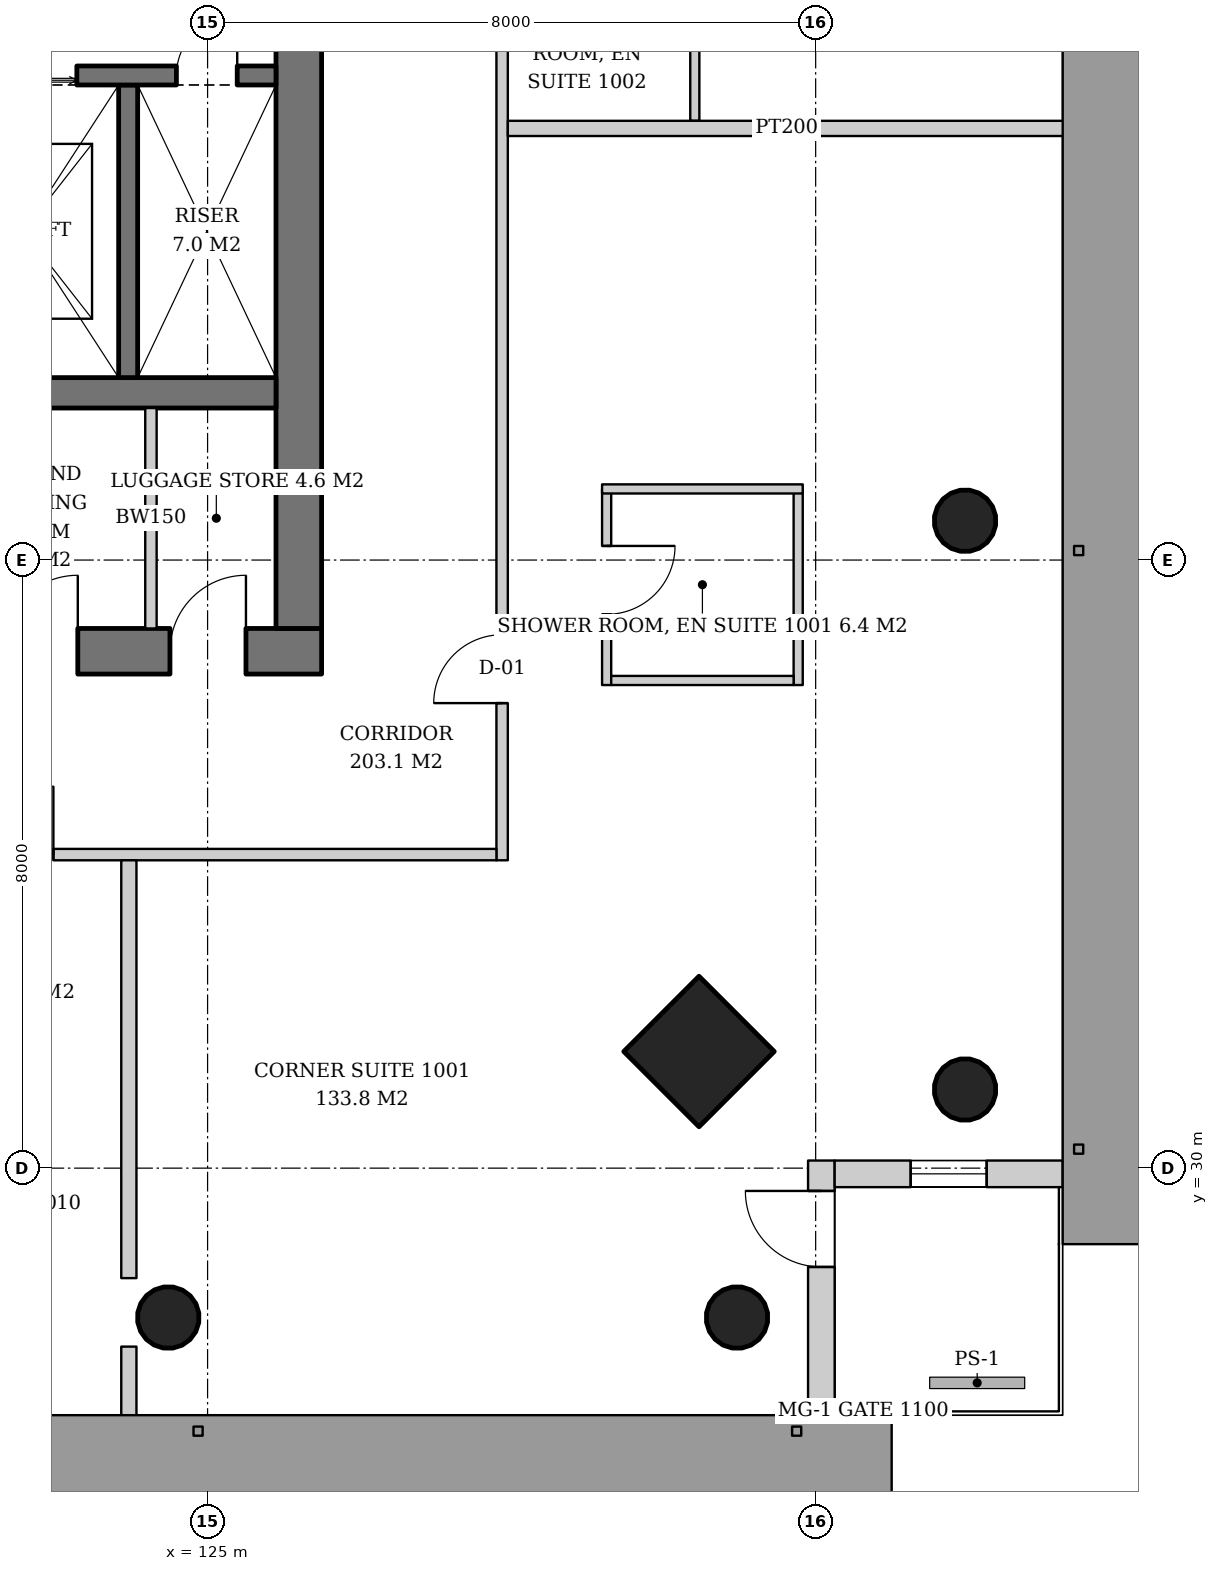
"""IFC4 building model, lengths in metres.
Left out: names, types, materials, properties, quantities, classifications, styles, units other than length and angle.
Written with IfcOpenShell. Run it as: python <this file> out.ifc"""

import sys

from ifc_helpers import new_model, si_unit, direction, frame, frame_2d, origin, origin_2d, place, context, subcontext, project, spatial, rectangle, hollow_circle, extrude, element, fill, save


model = new_model("IFC4")
c1 = context("Model", 3, precision=1e-05, world=origin(), true_north=direction((0.0, 1.0)))
c2 = subcontext(c1, "Body", "Model", "MODEL_VIEW")
j1 = project(units=[si_unit("LENGTHUNIT", "METRE"), si_unit("PLANEANGLEUNIT", "RADIAN")], contexts=[c1])
p1 = place(None, origin())
s1 = spatial("IfcSite", under=j1, at=p1, CompositionType="ELEMENT")
p2 = place(p1, origin())
s2 = spatial("IfcBuilding", under=s1, at=p2, CompositionType="ELEMENT")
p3 = place(p2, frame((0.0, 0.0, 43.8)))
s3 = spatial("IfcBuildingStorey", under=s2, at=p3, CompositionType="ELEMENT", Elevation=43.8)
p4 = place(p3, frame((135.017, 30.983, 0.0), z_axis=(-0.043029647111, 0.043029647111, 0.998146732169), x_axis=(-0.707106781187, -0.707106781187, 0.0)))
e1 = element("IfcColumn", 1, at=p4, inside=s3, PredefinedType="COLUMN", context=c2, shape_type="SweptSolid", body=[
    extrude(hollow_circle(Radius=0.406, WallThickness=0.03, at=origin_2d()), origin(), (0.0, 0.0, 1.0), 3.807),
])
p5 = place(p3, frame((135.017, 38.491, 0.0), z_axis=(-0.043059584825, 0.021497706284, 0.998841188968), x_axis=(-0.446680166538, -0.894693706707, 0.0)))
e2 = element("IfcColumn", 2, at=p5, inside=s3, PredefinedType="COLUMN", context=c2, shape_type="SweptSolid", body=[
    extrude(hollow_circle(Radius=0.406, WallThickness=0.03, at=origin_2d()), origin(), (0.0, 0.0, 1.0), 3.804),
])
p6 = place(p3, frame((131.517, 31.483, 0.0), z_axis=(-0.043029647111, 0.043029647111, 0.998146732169), x_axis=(-0.707106781187, -0.707106781187, 0.0)))
e3 = element("IfcColumn", 3, at=p6, inside=s3, PredefinedType="COLUMN", context=c2, shape_type="SweptSolid", body=[
    extrude(rectangle(XDim=1.4, YDim=1.4, at=origin_2d()), origin(), (0.0, 0.0, 1.0), 3.807),
])
p7 = place(p3, frame((132.017, 27.983, 0.0), z_axis=(-0.043029647111, 0.043029647111, 0.998146732169), x_axis=(-0.707106781187, -0.707106781187, 0.0)))
e4 = element("IfcColumn", 4, at=p7, inside=s3, PredefinedType="COLUMN", context=c2, shape_type="SweptSolid", body=[
    extrude(hollow_circle(Radius=0.406, WallThickness=0.03, at=origin_2d()), origin(), (0.0, 0.0, 1.0), 3.807),
])
p8 = place(p3, frame((124.509, 27.983, 0.0), z_axis=(-0.021497706284, 0.043059584825, 0.998841188968), x_axis=(-0.894693706707, -0.446680166538, 0.0)))
e5 = element("IfcColumn", 5, at=p8, inside=s3, PredefinedType="COLUMN", context=c2, shape_type="SweptSolid", body=[
    extrude(hollow_circle(Radius=0.406, WallThickness=0.03, at=origin_2d()), origin(), (0.0, 0.0, 1.0), 3.804),
])
p9 = place(p3, frame((107.5, 36.8, 0.0), z_axis=(0.0, 0.0, 1.0), x_axis=(1.0, 0.0, 0.0)))
e6 = element("IfcWall", 6, at=p9, inside=s3, PredefinedType="SHEAR", context=c2, shape_type="SweptSolid", body=[
    extrude(rectangle(XDim=19.0, YDim=0.6, at=frame_2d((9.5, 0.0))), origin(), (0.0, 0.0, 1.0), 3.8),
])
p10 = place(p9, frame((3.9, 0.0, 0.0)))
e7 = element("IfcOpeningElement", 7, at=p10, cuts=e6, PredefinedType="OPENING", context=c2, shape_type="SweptSolid", body=[
    extrude(rectangle(XDim=1.0, YDim=2.1, at=frame_2d((0.5, 1.05))), frame((0.0, 0.31, 0.0), z_axis=(0.0, -1.0, 0.0), x_axis=(1.0, 0.0, 0.0)), (0.0, 0.0, 1.0), 0.62),
])
p11 = place(p9, frame((14.792, 0.0, 0.0)))
e8 = element("IfcOpeningElement", 8, at=p11, cuts=e6, PredefinedType="OPENING", context=c2, shape_type="SweptSolid", body=[
    extrude(rectangle(XDim=1.0, YDim=2.1, at=frame_2d((0.5, 1.05))), frame((0.0, 0.31, 0.0), z_axis=(0.0, -1.0, 0.0), x_axis=(1.0, 0.0, 0.0)), (0.0, 0.0, 1.0), 0.62),
])
p12 = place(p9, frame((17.005, 0.0, 0.0)))
e9 = element("IfcOpeningElement", 9, at=p12, cuts=e6, PredefinedType="OPENING", context=c2, shape_type="SweptSolid", body=[
    extrude(rectangle(XDim=1.0, YDim=2.1, at=frame_2d((0.5, 1.05))), frame((0.0, 0.31, 0.0), z_axis=(0.0, -1.0, 0.0), x_axis=(1.0, 0.0, 0.0)), (0.0, 0.0, 1.0), 0.62),
])
p13 = place(p3, frame((126.2, 37.1, 0.0), z_axis=(0.0, 0.0, 1.0), x_axis=(0.0, 1.0, 0.0)))
e10 = element("IfcWall", 10, at=p13, inside=s3, PredefinedType="SHEAR", context=c2, shape_type="SweptSolid", body=[
    extrude(rectangle(XDim=17.8, YDim=0.6, at=frame_2d((8.9, 0.0))), origin(), (0.0, 0.0, 1.0), 3.8),
])
p14 = place(p13, frame((8.0, 0.0, 0.0)))
e11 = element("IfcOpeningElement", 11, at=p14, cuts=e10, PredefinedType="OPENING", context=c2, shape_type="SweptSolid", body=[
    extrude(rectangle(XDim=1.8, YDim=2.4, at=frame_2d((0.9, 1.2))), frame((0.0, 0.31, 0.0), z_axis=(0.0, -1.0, 0.0), x_axis=(1.0, 0.0, 0.0)), (0.0, 0.0, 1.0), 0.62),
])
p15 = place(p3, frame((108.1, 40.2, 0.0), z_axis=(0.0, 0.0, 1.0), x_axis=(1.0, 0.0, 0.0)))
e12 = element("IfcWall", 12, at=p15, inside=s3, PredefinedType="SHEAR", context=c2, shape_type="SweptSolid", body=[
    extrude(rectangle(XDim=17.8, YDim=0.4, at=frame_2d((8.9, 0.0))), origin(), (0.0, 0.0, 1.0), 3.8),
])
p16 = place(p3, frame((133.075, 26.75, 0.0), z_axis=(0.0, 0.0, 1.0), x_axis=(0.0, 1.0, 0.0)))
e13 = element("IfcWall", 13, at=p16, inside=s3, PredefinedType="SOLIDWALL", context=c2, shape_type="SweptSolid", body=[
    extrude(rectangle(XDim=3.35, YDim=0.35, at=frame_2d((1.675, 0.0))), origin(), (0.0, 0.0, 1.0), 3.6),
])
p17 = place(p16, frame((1.95, 0.0, 0.0)))
e14 = element("IfcOpeningElement", 14, at=p17, cuts=e13, PredefinedType="OPENING", context=c2, shape_type="SweptSolid", body=[
    extrude(rectangle(XDim=1.0, YDim=2.4, at=frame_2d((0.5, 1.2))), frame((0.0, 0.185, 0.0), z_axis=(0.0, -1.0, 0.0), x_axis=(1.0, 0.0, 0.0)), (0.0, 0.0, 1.0), 0.37),
])
p18 = place(p3, frame((133.25, 29.925, 0.0), z_axis=(0.0, 0.0, 1.0), x_axis=(1.0, 0.0, 0.0)))
e15 = element("IfcWall", 15, at=p18, inside=s3, PredefinedType="SOLIDWALL", context=c2, shape_type="SweptSolid", body=[
    extrude(rectangle(XDim=3.0, YDim=0.35, at=frame_2d((1.5, 0.0))), origin(), (0.0, 0.0, 1.0), 3.6),
])
p19 = place(p18, frame((1.0, 0.0, 0.9)))
e16 = element("IfcOpeningElement", 16, at=p19, cuts=e15, PredefinedType="OPENING", context=c2, shape_type="SweptSolid", body=[
    extrude(rectangle(XDim=1.0, YDim=2.4, at=frame_2d((0.5, 1.2))), frame((0.0, 0.185, 0.0), z_axis=(0.0, -1.0, 0.0), x_axis=(1.0, 0.0, 0.0)), (0.0, 0.0, 1.0), 0.37),
])
p20 = place(p3, frame((123.955, 44.25, 0.0), z_axis=(0.0, 0.0, 1.0), x_axis=(0.0, -1.0, 0.0)))
e17 = element("IfcWall", 17, at=p20, inside=s3, PredefinedType="SHEAR", context=c2, shape_type="SweptSolid", body=[
    extrude(rectangle(XDim=3.85, YDim=0.25, at=frame_2d((1.925, 0.0))), origin(), (0.0, 0.0, 1.0), 3.8),
])
p21 = place(p3, frame((121.33, 44.375, 0.0), z_axis=(0.0, 0.0, 1.0), x_axis=(1.0, 0.0, 0.0)))
e18 = element("IfcWall", 18, at=p21, inside=s3, PredefinedType="SHEAR", context=c2, shape_type="SweptSolid", body=[
    extrude(rectangle(XDim=4.57, YDim=0.25, at=frame_2d((2.285, 0.0))), origin(), (0.0, 0.0, 1.0), 3.8),
])
p22 = place(p21, frame((0.55, 0.0, 0.0)))
e19 = element("IfcOpeningElement", 19, at=p22, cuts=e18, PredefinedType="OPENING", context=c2, shape_type="SweptSolid", body=[
    extrude(rectangle(XDim=1.4, YDim=2.4, at=frame_2d((0.7, 1.2))), frame((0.0, 0.135, 0.0), z_axis=(0.0, -1.0, 0.0), x_axis=(1.0, 0.0, 0.0)), (0.0, 0.0, 1.0), 0.27),
])
p23 = place(p21, frame((3.26, 0.0, 0.0)))
e20 = element("IfcOpeningElement", 20, at=p23, cuts=e18, PredefinedType="OPENING", context=c2, shape_type="SweptSolid", body=[
    extrude(rectangle(XDim=0.8, YDim=2.0, at=frame_2d((0.4, 1.0))), frame((0.0, 0.135, 0.0), z_axis=(0.0, -1.0, 0.0), x_axis=(1.0, 0.0, 0.0)), (0.0, 0.0, 1.0), 0.27),
])
p24 = place(p3, frame((124.255, 37.1, 0.0), z_axis=(0.0, 0.0, 1.0), x_axis=(0.0, 1.0, 0.0)))
e21 = element("IfcWall", 21, at=p24, inside=s3, PredefinedType="SOLIDWALL", context=c2, shape_type="SweptSolid", body=[
    extrude(rectangle(XDim=2.9, YDim=0.15, at=frame_2d((1.45, 0.0))), origin(), (0.0, 0.0, 1.0), 3.6),
])
p25 = place(p3, frame((130.25, 38.936, 0.0), z_axis=(0.0, 0.0, 1.0), x_axis=(0.0, -1.0, 0.0)))
e22 = element("IfcWall", 22, at=p25, inside=s3, PredefinedType="PARTITIONING", context=c2, shape_type="SweptSolid", body=[
    extrude(rectangle(XDim=2.58, YDim=0.12, at=frame_2d((1.29, 0.0))), origin(), (0.0, 0.0, 1.0), 2.8),
])
p26 = place(p25, frame((0.75, 0.0, 0.0)))
e23 = element("IfcOpeningElement", 23, at=p26, cuts=e22, PredefinedType="OPENING", context=c2, shape_type="SweptSolid", body=[
    extrude(rectangle(XDim=0.9, YDim=2.1, at=frame_2d((0.45, 1.05))), frame((0.0, 0.07, 0.0), z_axis=(0.0, -1.0, 0.0), x_axis=(1.0, 0.0, 0.0)), (0.0, 0.0, 1.0), 0.14),
])
p27 = place(p3, frame((132.77, 38.936, 0.0), z_axis=(0.0, 0.0, 1.0), x_axis=(0.0, -1.0, 0.0)))
e24 = element("IfcWall", 24, at=p27, inside=s3, PredefinedType="PARTITIONING", context=c2, shape_type="SweptSolid", body=[
    extrude(rectangle(XDim=2.58, YDim=0.12, at=frame_2d((1.29, 0.0))), origin(), (0.0, 0.0, 1.0), 2.8),
])
p28 = place(p3, frame((130.31, 36.416, 0.0), z_axis=(0.0, 0.0, 1.0), x_axis=(1.0, 0.0, 0.0)))
e25 = element("IfcWall", 25, at=p28, inside=s3, PredefinedType="PARTITIONING", context=c2, shape_type="SweptSolid", body=[
    extrude(rectangle(XDim=2.4, YDim=0.12, at=frame_2d((1.2, 0.0))), origin(), (0.0, 0.0, 1.0), 2.847),
])
p29 = place(p3, frame((130.19, 38.936, 0.0), z_axis=(0.0, 0.0, 1.0), x_axis=(1.0, 0.0, 0.0)))
e26 = element("IfcWall", 26, at=p29, inside=s3, PredefinedType="PARTITIONING", context=c2, shape_type="SweptSolid", body=[
    extrude(rectangle(XDim=2.64, YDim=0.12, at=frame_2d((1.32, 0.0))), origin(), (0.0, 0.0, 1.0), 3.6),
])
p30 = place(p3, frame((131.41, 43.779, 0.0), z_axis=(0.0, 0.0, 1.0), x_axis=(0.0, 1.0, 0.0)))
e27 = element("IfcWall", 27, at=p30, inside=s3, PredefinedType="PARTITIONING", context=c2, shape_type="SweptSolid", body=[
    extrude(rectangle(XDim=2.42, YDim=0.12, at=frame_2d((1.21, 0.0))), origin(), (0.0, 0.0, 1.0), 2.847),
])
p31 = place(p3, frame((128.875, 34.05, 0.0), z_axis=(0.0, 0.0, 1.0), x_axis=(0.0, 1.0, 0.0)))
e28 = element("IfcWall", 28, at=p31, inside=s3, PredefinedType="PARTITIONING", context=c2, shape_type="SweptSolid", body=[
    extrude(rectangle(XDim=23.75, YDim=0.15, at=frame_2d((11.875, 0.0))), origin(), (0.0, 0.0, 1.0), 2.8),
])
p32 = place(p31, frame((2.068, 0.0, 0.0)))
e29 = element("IfcOpeningElement", 29, at=p32, cuts=e28, PredefinedType="OPENING", context=c2, shape_type="SweptSolid", body=[
    extrude(rectangle(XDim=0.9, YDim=2.1, at=frame_2d((0.45, 1.05))), frame((0.0, 0.085, 0.0), z_axis=(0.0, -1.0, 0.0), x_axis=(1.0, 0.0, 0.0)), (0.0, 0.0, 1.0), 0.17),
])
p33 = place(p31, frame((12.379, 0.0, 0.0)))
e30 = element("IfcOpeningElement", 30, at=p33, cuts=e28, PredefinedType="OPENING", context=c2, shape_type="SweptSolid", body=[
    extrude(rectangle(XDim=0.9, YDim=2.1, at=frame_2d((0.45, 1.05))), frame((0.0, 0.085, 0.0), z_axis=(0.0, -1.0, 0.0), x_axis=(1.0, 0.0, 0.0)), (0.0, 0.0, 1.0), 0.17),
])
p34 = place(p3, frame((128.95, 43.678, 0.0), z_axis=(0.0, 0.0, 1.0), x_axis=(1.0, 0.0, 0.0)))
e31 = element("IfcWall", 31, at=p34, inside=s3, PredefinedType="PARTITIONING", context=c2, shape_type="SweptSolid", body=[
    extrude(rectangle(XDim=7.34, YDim=0.2, at=frame_2d((3.67, 0.0))), origin(), (0.0, 0.0, 1.0), 3.05),
])
p35 = place(p3, frame((105.05, 34.125, 0.0), z_axis=(0.0, 0.0, 1.0), x_axis=(1.0, 0.0, 0.0)))
e32 = element("IfcWall", 32, at=p35, inside=s3, PredefinedType="PARTITIONING", context=c2, shape_type="SweptSolid", body=[
    extrude(rectangle(XDim=23.75, YDim=0.15, at=frame_2d((11.875, 0.0))), origin(), (0.0, 0.0, 1.0), 2.8),
])
p36 = place(p35, frame((2.068, 0.0, 0.0)))
e33 = element("IfcOpeningElement", 33, at=p36, cuts=e32, PredefinedType="OPENING", context=c2, shape_type="SweptSolid", body=[
    extrude(rectangle(XDim=0.9, YDim=2.1, at=frame_2d((0.45, 1.05))), frame((0.0, 0.085, 0.0), z_axis=(0.0, -1.0, 0.0), x_axis=(1.0, 0.0, 0.0)), (0.0, 0.0, 1.0), 0.17),
])
p37 = place(p35, frame((7.736, 0.0, 0.0)))
e34 = element("IfcOpeningElement", 34, at=p37, cuts=e32, PredefinedType="OPENING", context=c2, shape_type="SweptSolid", body=[
    extrude(rectangle(XDim=0.9, YDim=2.1, at=frame_2d((0.45, 1.05))), frame((0.0, 0.085, 0.0), z_axis=(0.0, -1.0, 0.0), x_axis=(1.0, 0.0, 0.0)), (0.0, 0.0, 1.0), 0.17),
])
p38 = place(p35, frame((17.021, 0.0, 0.0)))
e35 = element("IfcOpeningElement", 35, at=p38, cuts=e32, PredefinedType="OPENING", context=c2, shape_type="SweptSolid", body=[
    extrude(rectangle(XDim=0.9, YDim=2.1, at=frame_2d((0.45, 1.05))), frame((0.0, 0.085, 0.0), z_axis=(0.0, -1.0, 0.0), x_axis=(1.0, 0.0, 0.0)), (0.0, 0.0, 1.0), 0.17),
])
p39 = place(p3, frame((123.964, 34.05, 0.0), z_axis=(0.0, 0.0, 1.0), x_axis=(0.0, -1.0, 0.0)))
e36 = element("IfcWall", 36, at=p39, inside=s3, PredefinedType="PARTITIONING", context=c2, shape_type="SweptSolid", body=[
    extrude(rectangle(XDim=5.497, YDim=0.2, at=frame_2d((2.749, 0.0))), origin(), (0.0, 0.0, 1.0), 3.6),
])
p40 = place(p3, frame((123.964, 27.652, 0.0), z_axis=(0.0, 0.0, 1.0), x_axis=(0.0, -1.0, 0.0)))
e37 = element("IfcWall", 37, at=p40, inside=s3, PredefinedType="PARTITIONING", context=c2, shape_type="SweptSolid", body=[
    extrude(rectangle(XDim=0.942, YDim=0.2, at=frame_2d((0.471, 0.0))), origin(), (0.0, 0.0, 1.0), 3.6),
])
p41 = place(p17, origin())
e38 = element("IfcDoor", 38, at=p41, inside=s3, OperationType="SINGLE_SWING_RIGHT", PredefinedType="DOOR", context=c2, shape_type="SweptSolid", body=[
    extrude(rectangle(XDim=1.0, YDim=2.4, at=frame_2d((0.5, 1.2))), frame((0.0, 0.025, 0.0), z_axis=(0.0, -1.0, 0.0), x_axis=(1.0, 0.0, 0.0)), (0.0, 0.0, 1.0), 0.05),
])
fill(e14, e38)
p42 = place(p19, origin())
e39 = element("IfcWindow", 39, at=p42, inside=s3, PartitioningType="SINGLE_PANEL", PredefinedType="WINDOW", context=c2, shape_type="SweptSolid", body=[
    extrude(rectangle(XDim=1.0, YDim=2.4, at=frame_2d((0.5, 1.2))), frame((0.0, 0.03, 0.0), z_axis=(0.0, -1.0, 0.0), x_axis=(1.0, 0.0, 0.0)), (0.0, 0.0, 1.0), 0.06),
])
fill(e16, e39)
p43 = place(p22, origin())
e40 = element("IfcDoor", 40, at=p43, inside=s3, OperationType="DOUBLE_DOOR_SLIDING", PredefinedType="DOOR", context=c2, shape_type="SweptSolid", body=[
    extrude(rectangle(XDim=1.4, YDim=2.4, at=frame_2d((0.7, 1.2))), frame((0.0, 0.025, 0.0), z_axis=(0.0, -1.0, 0.0), x_axis=(1.0, 0.0, 0.0)), (0.0, 0.0, 1.0), 0.05),
])
fill(e19, e40)
p44 = place(p23, origin())
e41 = element("IfcDoor", 41, at=p44, inside=s3, OperationType="SINGLE_SWING_RIGHT", PredefinedType="DOOR", context=c2, shape_type="SweptSolid", body=[
    extrude(rectangle(XDim=0.8, YDim=2.0, at=frame_2d((0.4, 1.0))), frame((0.0, 0.025, 0.0), z_axis=(0.0, -1.0, 0.0), x_axis=(1.0, 0.0, 0.0)), (0.0, 0.0, 1.0), 0.05),
])
fill(e20, e41)
p45 = place(p11, origin())
e42 = element("IfcDoor", 42, at=p45, inside=s3, OperationType="SINGLE_SWING_RIGHT", PredefinedType="DOOR", context=c2, shape_type="SweptSolid", body=[
    extrude(rectangle(XDim=1.0, YDim=2.1, at=frame_2d((0.5, 1.05))), frame((0.0, 0.29, 0.0), z_axis=(0.0, -1.0, 0.0), x_axis=(1.0, 0.0, 0.0)), (0.0, 0.0, 1.0), 0.05),
])
fill(e8, e42)
p46 = place(p12, origin())
e43 = element("IfcDoor", 43, at=p46, inside=s3, OperationType="SINGLE_SWING_RIGHT", PredefinedType="DOOR", context=c2, shape_type="SweptSolid", body=[
    extrude(rectangle(XDim=1.0, YDim=2.1, at=frame_2d((0.5, 1.05))), frame((0.0, 0.29, 0.0), z_axis=(0.0, -1.0, 0.0), x_axis=(1.0, 0.0, 0.0)), (0.0, 0.0, 1.0), 0.05),
])
fill(e9, e43)
p47 = place(p26, origin())
e44 = element("IfcDoor", 44, at=p47, inside=s3, OperationType="SINGLE_SWING_LEFT", PredefinedType="DOOR", context=c2, shape_type="SweptSolid", body=[
    extrude(rectangle(XDim=0.9, YDim=2.1, at=frame_2d((0.45, 1.05))), frame((0.0, 0.025, 0.0), z_axis=(0.0, -1.0, 0.0), x_axis=(1.0, 0.0, 0.0)), (0.0, 0.0, 1.0), 0.05),
])
fill(e23, e44)
p48 = place(p32, origin())
e45 = element("IfcDoor", 45, at=p48, inside=s3, OperationType="SINGLE_SWING_LEFT", PredefinedType="DOOR", context=c2, shape_type="SweptSolid", body=[
    extrude(rectangle(XDim=0.9, YDim=2.1, at=frame_2d((0.45, 1.05))), frame((0.0, 0.025, 0.0), z_axis=(0.0, -1.0, 0.0), x_axis=(1.0, 0.0, 0.0)), (0.0, 0.0, 1.0), 0.05),
])
fill(e29, e45)
p49 = place(p38, origin())
e46 = element("IfcDoor", 46, at=p49, inside=s3, OperationType="SINGLE_SWING_RIGHT", PredefinedType="DOOR", context=c2, shape_type="SweptSolid", body=[
    extrude(rectangle(XDim=0.9, YDim=2.1, at=frame_2d((0.45, 1.05))), frame((0.0, 0.025, 0.0), z_axis=(0.0, -1.0, 0.0), x_axis=(1.0, 0.0, 0.0)), (0.0, 0.0, 1.0), 0.05),
])
fill(e35, e46)
save(model, sys.argv[1])
